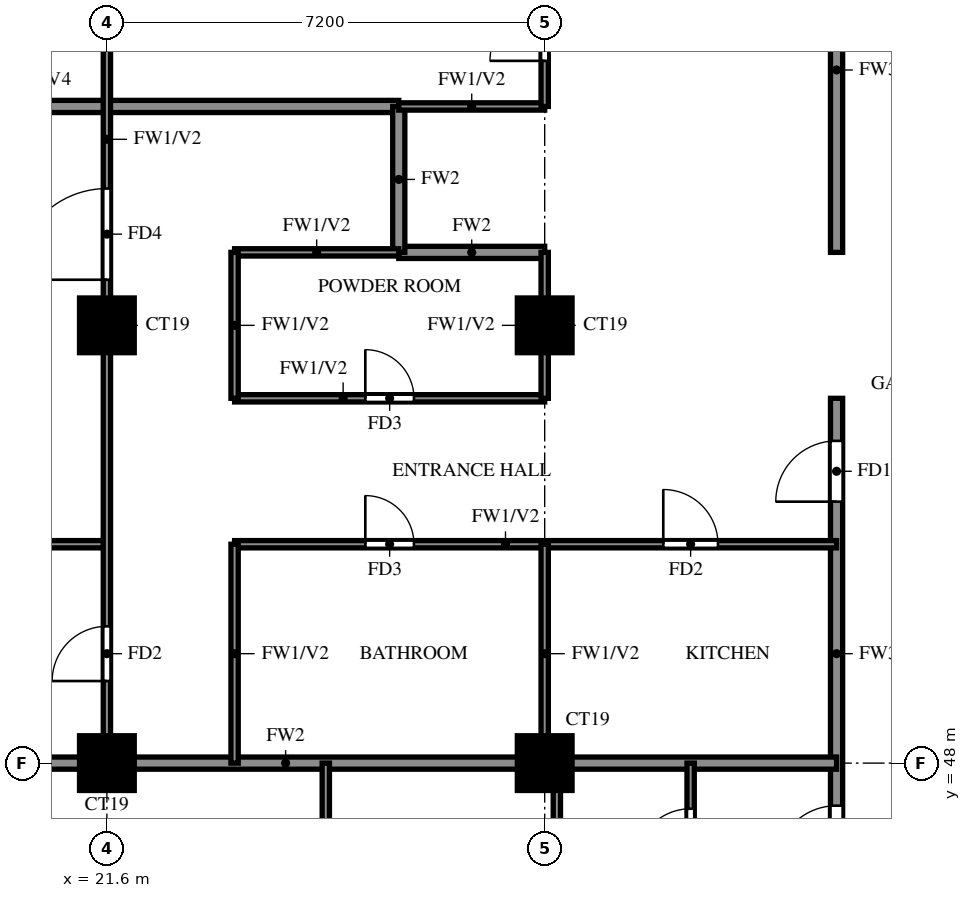
"""IFC4 building model, lengths in metres.
Left out: names, types, materials, properties, quantities, classifications, styles, units other than length and angle.
Written with IfcOpenShell. Run it as: python <this file> out.ifc"""

import sys

from ifc_helpers import new_model, si_unit, direction, frame, frame_2d, origin, origin_2d, place, context, subcontext, project, spatial, rectangle, extrude, source, transform, mapped, element, fill, save


model = new_model("IFC4")
c1 = context("Model", 3, precision=1e-05, world=origin(), true_north=direction((0.0, 1.0)))
c2 = subcontext(c1, "Body", "Model", "MODEL_VIEW")
j1 = project(units=[si_unit("LENGTHUNIT", "METRE"), si_unit("PLANEANGLEUNIT", "RADIAN")], contexts=[c1])
p1 = place(None, origin())
s1 = spatial("IfcSite", under=j1, at=p1, CompositionType="ELEMENT")
p2 = place(p1, origin())
s2 = spatial("IfcBuilding", under=s1, at=p2, CompositionType="ELEMENT")
p3 = place(p2, frame((0.0, 0.0, 178.0)))
s3 = spatial("IfcBuildingStorey", under=s2, at=p3, CompositionType="ELEMENT", Elevation=178.0)
m1 = source(origin(), c2, "Body", "SweptSolid", [
    extrude(rectangle(XDim=0.9, YDim=0.9, at=origin_2d()), origin(), (0.0, 0.0, 1.0), 3.2),
])
for number, where, z_axis, x_axis in (
    (1, (21.6, 48.0, 0.0), (0.0, 0.0, 1.0), (1.0, 0.0, 0.0)),
    (2, (28.8, 48.0, 0.0), (0.0, 0.0, 1.0), (1.0, 0.0, 0.0)),
    (3, (21.6, 55.2, 0.0), (0.0, 0.0, 1.0), (1.0, 0.0, 0.0)),
    (4, (28.8, 55.2, 0.0), (0.0, 0.0, 1.0), (1.0, 0.0, 0.0)),
):
    element("IfcColumn", number, at=place(p3, frame(where, z_axis=z_axis, x_axis=x_axis)), inside=s3, PredefinedType="COLUMN", context=c2, shape_type="MappedRepresentation", body=[
        mapped(m1, transform((0.0, 0.0, 0.0))),
    ])
p4 = place(p3, frame((33.6, 45.6, 0.0), z_axis=(0.0, 0.0, 1.0), x_axis=(0.0, 1.0, 0.0)))
e5 = element("IfcWall", 5, at=p4, inside=s3, PredefinedType="SOLIDWALL", context=c2, shape_type="SweptSolid", body=[
    extrude(rectangle(XDim=8.4, YDim=0.2, at=frame_2d((4.2, 0.0))), origin(), (0.0, 0.0, 1.0), 3.2),
])
p5 = place(p4, frame((0.7, 0.0, 0.0)))
e6 = element("IfcOpeningElement", 6, at=p5, cuts=e5, PredefinedType="OPENING", context=c2, shape_type="SweptSolid", body=[
    extrude(rectangle(XDim=1.0, YDim=2.1, at=frame_2d((0.5, 1.05))), frame((0.0, 0.11, 0.0), z_axis=(0.0, -1.0, 0.0), x_axis=(1.0, 0.0, 0.0)), (0.0, 0.0, 1.0), 0.22),
])
p6 = place(p4, frame((6.7, 0.0, 0.0)))
e7 = element("IfcOpeningElement", 7, at=p6, cuts=e5, PredefinedType="OPENING", context=c2, shape_type="SweptSolid", body=[
    extrude(rectangle(XDim=1.0, YDim=2.1, at=frame_2d((0.5, 1.05))), frame((0.0, 0.11, 0.0), z_axis=(0.0, -1.0, 0.0), x_axis=(1.0, 0.0, 0.0)), (0.0, 0.0, 1.0), 0.22),
])
p7 = place(p3, frame((33.6, 56.4, 0.0), z_axis=(0.0, 0.0, 1.0), x_axis=(0.0, 1.0, 0.0)))
e8 = element("IfcWall", 8, at=p7, inside=s3, PredefinedType="SOLIDWALL", context=c2, shape_type="SweptSolid", body=[
    extrude(rectangle(XDim=6.0, YDim=0.2, at=frame_2d((3.0, 0.0))), origin(), (0.0, 0.0, 1.0), 3.2),
])
p8 = place(p7, frame((3.7, 0.0, 0.0)))
e9 = element("IfcOpeningElement", 9, at=p8, cuts=e8, PredefinedType="OPENING", context=c2, shape_type="SweptSolid", body=[
    extrude(rectangle(XDim=1.0, YDim=2.1, at=frame_2d((0.5, 1.05))), frame((0.0, 0.11, 0.0), z_axis=(0.0, -1.0, 0.0), x_axis=(1.0, 0.0, 0.0)), (0.0, 0.0, 1.0), 0.22),
])
p9 = place(p3, frame((14.525, 48.0, 0.0), z_axis=(0.0, 0.0, 1.0), x_axis=(1.0, 0.0, 0.0)))
e10 = element("IfcWall", 10, at=p9, inside=s3, PredefinedType="SOLIDWALL", context=c2, shape_type="SweptSolid", body=[
    extrude(rectangle(XDim=19.075, YDim=0.2, at=frame_2d((9.538, 0.0))), origin(), (0.0, 0.0, 1.0), 3.2),
])
p10 = place(p3, frame((26.4, 56.4, 0.0), z_axis=(0.0, 0.0, 1.0), x_axis=(1.0, 0.0, 0.0)))
e11 = element("IfcWall", 11, at=p10, inside=s3, PredefinedType="SOLIDWALL", context=c2, shape_type="SweptSolid", body=[
    extrude(rectangle(XDim=2.4, YDim=0.2, at=frame_2d((1.2, 0.0))), origin(), (0.0, 0.0, 1.0), 3.2),
])
p11 = place(p3, frame((14.525, 58.8, 0.0), z_axis=(0.0, 0.0, 1.0), x_axis=(1.0, 0.0, 0.0)))
e12 = element("IfcWall", 12, at=p11, inside=s3, PredefinedType="SOLIDWALL", context=c2, shape_type="SweptSolid", body=[
    extrude(rectangle(XDim=11.875, YDim=0.2, at=frame_2d((5.938, 0.0))), origin(), (0.0, 0.0, 1.0), 2.3),
])
p12 = place(p3, frame((26.4, 56.4, 0.0), z_axis=(0.0, 0.0, 1.0), x_axis=(0.0, 1.0, 0.0)))
e13 = element("IfcWall", 13, at=p12, inside=s3, PredefinedType="SOLIDWALL", context=c2, shape_type="SweptSolid", body=[
    extrude(rectangle(XDim=2.4, YDim=0.2, at=frame_2d((1.2, 0.0))), origin(), (0.0, 0.0, 1.0), 3.2),
])
p13 = place(p3, frame((14.525, 51.6, 0.0), z_axis=(0.0, 0.0, 1.0), x_axis=(1.0, 0.0, 0.0)))
e14 = element("IfcWall", 14, at=p13, inside=s3, PredefinedType="PARTITIONING", context=c2, shape_type="SweptSolid", body=[
    extrude(rectangle(XDim=7.075, YDim=0.12, at=frame_2d((3.538, 0.0))), origin(), (0.0, 0.0, 1.0), 2.3),
])
p14 = place(p3, frame((23.7, 51.6, 0.0), z_axis=(0.0, 0.0, 1.0), x_axis=(1.0, 0.0, 0.0)))
e15 = element("IfcWall", 15, at=p14, inside=s3, PredefinedType="PARTITIONING", context=c2, shape_type="SweptSolid", body=[
    extrude(rectangle(XDim=9.9, YDim=0.12, at=frame_2d((4.95, 0.0))), origin(), (0.0, 0.0, 1.0), 3.2),
])
p15 = place(p14, frame((2.15, 0.0, 0.0)))
e16 = element("IfcOpeningElement", 16, at=p15, cuts=e15, PredefinedType="OPENING", context=c2, shape_type="SweptSolid", body=[
    extrude(rectangle(XDim=0.8, YDim=2.1, at=frame_2d((0.4, 1.05))), frame((0.0, 0.07, 0.0), z_axis=(0.0, -1.0, 0.0), x_axis=(1.0, 0.0, 0.0)), (0.0, 0.0, 1.0), 0.14),
])
p16 = place(p14, frame((7.05, 0.0, 0.0)))
e17 = element("IfcOpeningElement", 17, at=p16, cuts=e15, PredefinedType="OPENING", context=c2, shape_type="SweptSolid", body=[
    extrude(rectangle(XDim=0.9, YDim=2.1, at=frame_2d((0.45, 1.05))), frame((0.0, 0.07, 0.0), z_axis=(0.0, -1.0, 0.0), x_axis=(1.0, 0.0, 0.0)), (0.0, 0.0, 1.0), 0.14),
])
p17 = place(p3, frame((23.7, 54.0, 0.0), z_axis=(0.0, 0.0, 1.0), x_axis=(1.0, 0.0, 0.0)))
e18 = element("IfcWall", 18, at=p17, inside=s3, PredefinedType="PARTITIONING", context=c2, shape_type="SweptSolid", body=[
    extrude(rectangle(XDim=5.1, YDim=0.12, at=frame_2d((2.55, 0.0))), origin(), (0.0, 0.0, 1.0), 3.2),
])
p18 = place(p17, frame((2.15, 0.0, 0.0)))
e19 = element("IfcOpeningElement", 19, at=p18, cuts=e18, PredefinedType="OPENING", context=c2, shape_type="SweptSolid", body=[
    extrude(rectangle(XDim=0.8, YDim=2.1, at=frame_2d((0.4, 1.05))), frame((0.0, 0.07, 0.0), z_axis=(0.0, -1.0, 0.0), x_axis=(1.0, 0.0, 0.0)), (0.0, 0.0, 1.0), 0.14),
])
p19 = place(p3, frame((23.7, 56.4, 0.0), z_axis=(0.0, 0.0, 1.0), x_axis=(1.0, 0.0, 0.0)))
e20 = element("IfcWall", 20, at=p19, inside=s3, PredefinedType="PARTITIONING", context=c2, shape_type="SweptSolid", body=[
    extrude(rectangle(XDim=2.7, YDim=0.12, at=frame_2d((1.35, 0.0))), origin(), (0.0, 0.0, 1.0), 3.2),
])
p20 = place(p3, frame((26.4, 58.8, 0.0), z_axis=(0.0, 0.0, 1.0), x_axis=(1.0, 0.0, 0.0)))
e21 = element("IfcWall", 21, at=p20, inside=s3, PredefinedType="PARTITIONING", context=c2, shape_type="SweptSolid", body=[
    extrude(rectangle(XDim=2.4, YDim=0.12, at=frame_2d((1.2, 0.0))), origin(), (0.0, 0.0, 1.0), 3.2),
])
p21 = place(p3, frame((21.6, 48.0, 0.0), z_axis=(0.0, 0.0, 1.0), x_axis=(0.0, 1.0, 0.0)))
e22 = element("IfcWall", 22, at=p21, inside=s3, PredefinedType="PARTITIONING", context=c2, shape_type="SweptSolid", body=[
    extrude(rectangle(XDim=21.6, YDim=0.12, at=frame_2d((10.8, 0.0))), origin(), (0.0, 0.0, 1.0), 3.2),
])
p22 = place(p21, frame((1.35, 0.0, 0.0)))
e23 = element("IfcOpeningElement", 23, at=p22, cuts=e22, PredefinedType="OPENING", context=c2, shape_type="SweptSolid", body=[
    extrude(rectangle(XDim=0.9, YDim=2.1, at=frame_2d((0.45, 1.05))), frame((0.0, 0.07, 0.0), z_axis=(0.0, -1.0, 0.0), x_axis=(1.0, 0.0, 0.0)), (0.0, 0.0, 1.0), 0.14),
])
p23 = place(p21, frame((7.95, 0.0, 0.0)))
e24 = element("IfcOpeningElement", 24, at=p23, cuts=e22, PredefinedType="OPENING", context=c2, shape_type="SweptSolid", body=[
    extrude(rectangle(XDim=1.5, YDim=2.1, at=frame_2d((0.75, 1.05))), frame((0.0, 0.07, 0.0), z_axis=(0.0, -1.0, 0.0), x_axis=(1.0, 0.0, 0.0)), (0.0, 0.0, 1.0), 0.14),
])
p24 = place(p21, frame((12.15, 0.0, 0.0)))
e25 = element("IfcOpeningElement", 25, at=p24, cuts=e22, PredefinedType="OPENING", context=c2, shape_type="SweptSolid", body=[
    extrude(rectangle(XDim=0.9, YDim=2.1, at=frame_2d((0.45, 1.05))), frame((0.0, 0.07, 0.0), z_axis=(0.0, -1.0, 0.0), x_axis=(1.0, 0.0, 0.0)), (0.0, 0.0, 1.0), 0.14),
])
p25 = place(p21, frame((17.55, 0.0, 0.0)))
e26 = element("IfcOpeningElement", 26, at=p25, cuts=e22, PredefinedType="OPENING", context=c2, shape_type="SweptSolid", body=[
    extrude(rectangle(XDim=0.9, YDim=2.1, at=frame_2d((0.45, 1.05))), frame((0.0, 0.07, 0.0), z_axis=(0.0, -1.0, 0.0), x_axis=(1.0, 0.0, 0.0)), (0.0, 0.0, 1.0), 0.14),
])
p26 = place(p3, frame((23.7, 48.0, 0.0), z_axis=(0.0, 0.0, 1.0), x_axis=(0.0, 1.0, 0.0)))
e27 = element("IfcWall", 27, at=p26, inside=s3, PredefinedType="PARTITIONING", context=c2, shape_type="SweptSolid", body=[
    extrude(rectangle(XDim=3.6, YDim=0.12, at=frame_2d((1.8, 0.0))), origin(), (0.0, 0.0, 1.0), 3.2),
])
p27 = place(p3, frame((23.7, 54.0, 0.0), z_axis=(0.0, 0.0, 1.0), x_axis=(0.0, 1.0, 0.0)))
e28 = element("IfcWall", 28, at=p27, inside=s3, PredefinedType="PARTITIONING", context=c2, shape_type="SweptSolid", body=[
    extrude(rectangle(XDim=2.4, YDim=0.12, at=frame_2d((1.2, 0.0))), origin(), (0.0, 0.0, 1.0), 3.2),
])
p28 = place(p3, frame((25.2, 39.725, 0.0), z_axis=(0.0, 0.0, 1.0), x_axis=(0.0, 1.0, 0.0)))
e29 = element("IfcWall", 29, at=p28, inside=s3, PredefinedType="PARTITIONING", context=c2, shape_type="SweptSolid", body=[
    extrude(rectangle(XDim=8.275, YDim=0.12, at=frame_2d((4.137, 0.0))), origin(), (0.0, 0.0, 1.0), 3.2),
])
p29 = place(p28, frame((4.525, 0.0, 0.0)))
e30 = element("IfcOpeningElement", 30, at=p29, cuts=e29, PredefinedType="OPENING", context=c2, shape_type="SweptSolid", body=[
    extrude(rectangle(XDim=0.9, YDim=2.1, at=frame_2d((0.45, 1.05))), frame((0.0, 0.07, 0.0), z_axis=(0.0, -1.0, 0.0), x_axis=(1.0, 0.0, 0.0)), (0.0, 0.0, 1.0), 0.14),
])
p30 = place(p3, frame((28.8, 48.0, 0.0), z_axis=(0.0, 0.0, 1.0), x_axis=(0.0, 1.0, 0.0)))
e31 = element("IfcWall", 31, at=p30, inside=s3, PredefinedType="PARTITIONING", context=c2, shape_type="SweptSolid", body=[
    extrude(rectangle(XDim=3.6, YDim=0.12, at=frame_2d((1.8, 0.0))), origin(), (0.0, 0.0, 1.0), 3.2),
])
p31 = place(p3, frame((28.8, 54.0, 0.0), z_axis=(0.0, 0.0, 1.0), x_axis=(0.0, 1.0, 0.0)))
e32 = element("IfcWall", 32, at=p31, inside=s3, PredefinedType="PARTITIONING", context=c2, shape_type="SweptSolid", body=[
    extrude(rectangle(XDim=2.4, YDim=0.12, at=frame_2d((1.2, 0.0))), origin(), (0.0, 0.0, 1.0), 3.2),
])
p32 = place(p3, frame((28.8, 58.8, 0.0), z_axis=(0.0, 0.0, 1.0), x_axis=(0.0, 1.0, 0.0)))
e33 = element("IfcWall", 33, at=p32, inside=s3, PredefinedType="PARTITIONING", context=c2, shape_type="SweptSolid", body=[
    extrude(rectangle(XDim=3.6, YDim=0.12, at=frame_2d((1.8, 0.0))), origin(), (0.0, 0.0, 1.0), 3.2),
])
p33 = place(p32, frame((0.75, 0.0, 0.0)))
e34 = element("IfcOpeningElement", 34, at=p33, cuts=e33, PredefinedType="OPENING", context=c2, shape_type="SweptSolid", body=[
    extrude(rectangle(XDim=0.9, YDim=2.1, at=frame_2d((0.45, 1.05))), frame((0.0, 0.07, 0.0), z_axis=(0.0, -1.0, 0.0), x_axis=(1.0, 0.0, 0.0)), (0.0, 0.0, 1.0), 0.14),
])
p34 = place(p3, frame((29.0, 45.6, 0.0), z_axis=(0.0, 0.0, 1.0), x_axis=(0.0, 1.0, 0.0)))
e35 = element("IfcWall", 35, at=p34, inside=s3, PredefinedType="PARTITIONING", context=c2, shape_type="SweptSolid", body=[
    extrude(rectangle(XDim=2.4, YDim=0.12, at=frame_2d((1.2, 0.0))), origin(), (0.0, 0.0, 1.0), 3.2),
])
p35 = place(p3, frame((31.2, 45.6, 0.0), z_axis=(0.0, 0.0, 1.0), x_axis=(0.0, 1.0, 0.0)))
e36 = element("IfcWall", 36, at=p35, inside=s3, PredefinedType="PARTITIONING", context=c2, shape_type="SweptSolid", body=[
    extrude(rectangle(XDim=2.4, YDim=0.12, at=frame_2d((1.2, 0.0))), origin(), (0.0, 0.0, 1.0), 3.2),
])
p36 = place(p35, frame((0.75, 0.0, 0.0)))
e37 = element("IfcOpeningElement", 37, at=p36, cuts=e36, PredefinedType="OPENING", context=c2, shape_type="SweptSolid", body=[
    extrude(rectangle(XDim=0.9, YDim=2.1, at=frame_2d((0.45, 1.05))), frame((0.0, 0.07, 0.0), z_axis=(0.0, -1.0, 0.0), x_axis=(1.0, 0.0, 0.0)), (0.0, 0.0, 1.0), 0.14),
])
p37 = place(p5, origin())
e38 = element("IfcDoor", 38, at=p37, inside=s3, OperationType="SINGLE_SWING_LEFT", PredefinedType="DOOR", context=c2, shape_type="SweptSolid", body=[
    extrude(rectangle(XDim=1.0, YDim=2.1, at=frame_2d((0.5, 1.05))), frame((0.0, 0.025, 0.0), z_axis=(0.0, -1.0, 0.0), x_axis=(1.0, 0.0, 0.0)), (0.0, 0.0, 1.0), 0.05),
])
fill(e6, e38)
p38 = place(p36, origin())
e39 = element("IfcDoor", 39, at=p38, inside=s3, OperationType="SINGLE_SWING_LEFT", PredefinedType="DOOR", context=c2, shape_type="SweptSolid", body=[
    extrude(rectangle(XDim=0.9, YDim=2.1, at=frame_2d((0.45, 1.05))), frame((0.0, 0.025, 0.0), z_axis=(0.0, -1.0, 0.0), x_axis=(1.0, 0.0, 0.0)), (0.0, 0.0, 1.0), 0.05),
])
fill(e37, e39)
p39 = place(p6, origin())
e40 = element("IfcDoor", 40, at=p39, inside=s3, OperationType="SINGLE_SWING_RIGHT", PredefinedType="DOOR", context=c2, shape_type="SweptSolid", body=[
    extrude(rectangle(XDim=1.0, YDim=2.1, at=frame_2d((0.5, 1.05))), frame((0.0, 0.025, 0.0), z_axis=(0.0, -1.0, 0.0), x_axis=(1.0, 0.0, 0.0)), (0.0, 0.0, 1.0), 0.05),
])
fill(e7, e40)
p40 = place(p22, origin())
e41 = element("IfcDoor", 41, at=p40, inside=s3, OperationType="SINGLE_SWING_LEFT", PredefinedType="DOOR", context=c2, shape_type="SweptSolid", body=[
    extrude(rectangle(XDim=0.9, YDim=2.1, at=frame_2d((0.45, 1.05))), frame((0.0, 0.025, 0.0), z_axis=(0.0, -1.0, 0.0), x_axis=(1.0, 0.0, 0.0)), (0.0, 0.0, 1.0), 0.05),
])
fill(e23, e41)
p41 = place(p23, origin())
e42 = element("IfcDoor", 42, at=p41, inside=s3, OperationType="SINGLE_SWING_RIGHT", PredefinedType="DOOR", context=c2, shape_type="SweptSolid", body=[
    extrude(rectangle(XDim=1.5, YDim=2.1, at=frame_2d((0.75, 1.05))), frame((0.0, 0.025, 0.0), z_axis=(0.0, -1.0, 0.0), x_axis=(1.0, 0.0, 0.0)), (0.0, 0.0, 1.0), 0.05),
])
fill(e24, e42)
p42 = place(p15, origin())
e43 = element("IfcDoor", 43, at=p42, inside=s3, OperationType="SINGLE_SWING_RIGHT", PredefinedType="DOOR", context=c2, shape_type="SweptSolid", body=[
    extrude(rectangle(XDim=0.8, YDim=2.1, at=frame_2d((0.4, 1.05))), frame((0.0, 0.025, 0.0), z_axis=(0.0, -1.0, 0.0), x_axis=(1.0, 0.0, 0.0)), (0.0, 0.0, 1.0), 0.05),
])
fill(e16, e43)
p43 = place(p18, origin())
e44 = element("IfcDoor", 44, at=p43, inside=s3, OperationType="SINGLE_SWING_LEFT", PredefinedType="DOOR", context=c2, shape_type="SweptSolid", body=[
    extrude(rectangle(XDim=0.8, YDim=2.1, at=frame_2d((0.4, 1.05))), frame((0.0, 0.025, 0.0), z_axis=(0.0, -1.0, 0.0), x_axis=(1.0, 0.0, 0.0)), (0.0, 0.0, 1.0), 0.05),
])
fill(e19, e44)
p44 = place(p16, origin())
e45 = element("IfcDoor", 45, at=p44, inside=s3, OperationType="SINGLE_SWING_LEFT", PredefinedType="DOOR", context=c2, shape_type="SweptSolid", body=[
    extrude(rectangle(XDim=0.9, YDim=2.1, at=frame_2d((0.45, 1.05))), frame((0.0, 0.025, 0.0), z_axis=(0.0, -1.0, 0.0), x_axis=(1.0, 0.0, 0.0)), (0.0, 0.0, 1.0), 0.05),
])
fill(e17, e45)
p45 = place(p33, origin())
e46 = element("IfcDoor", 46, at=p45, inside=s3, OperationType="SINGLE_SWING_RIGHT", PredefinedType="DOOR", context=c2, shape_type="SweptSolid", body=[
    extrude(rectangle(XDim=0.9, YDim=2.1, at=frame_2d((0.45, 1.05))), frame((0.0, 0.025, 0.0), z_axis=(0.0, -1.0, 0.0), x_axis=(1.0, 0.0, 0.0)), (0.0, 0.0, 1.0), 0.05),
])
fill(e34, e46)
save(model, sys.argv[1])
